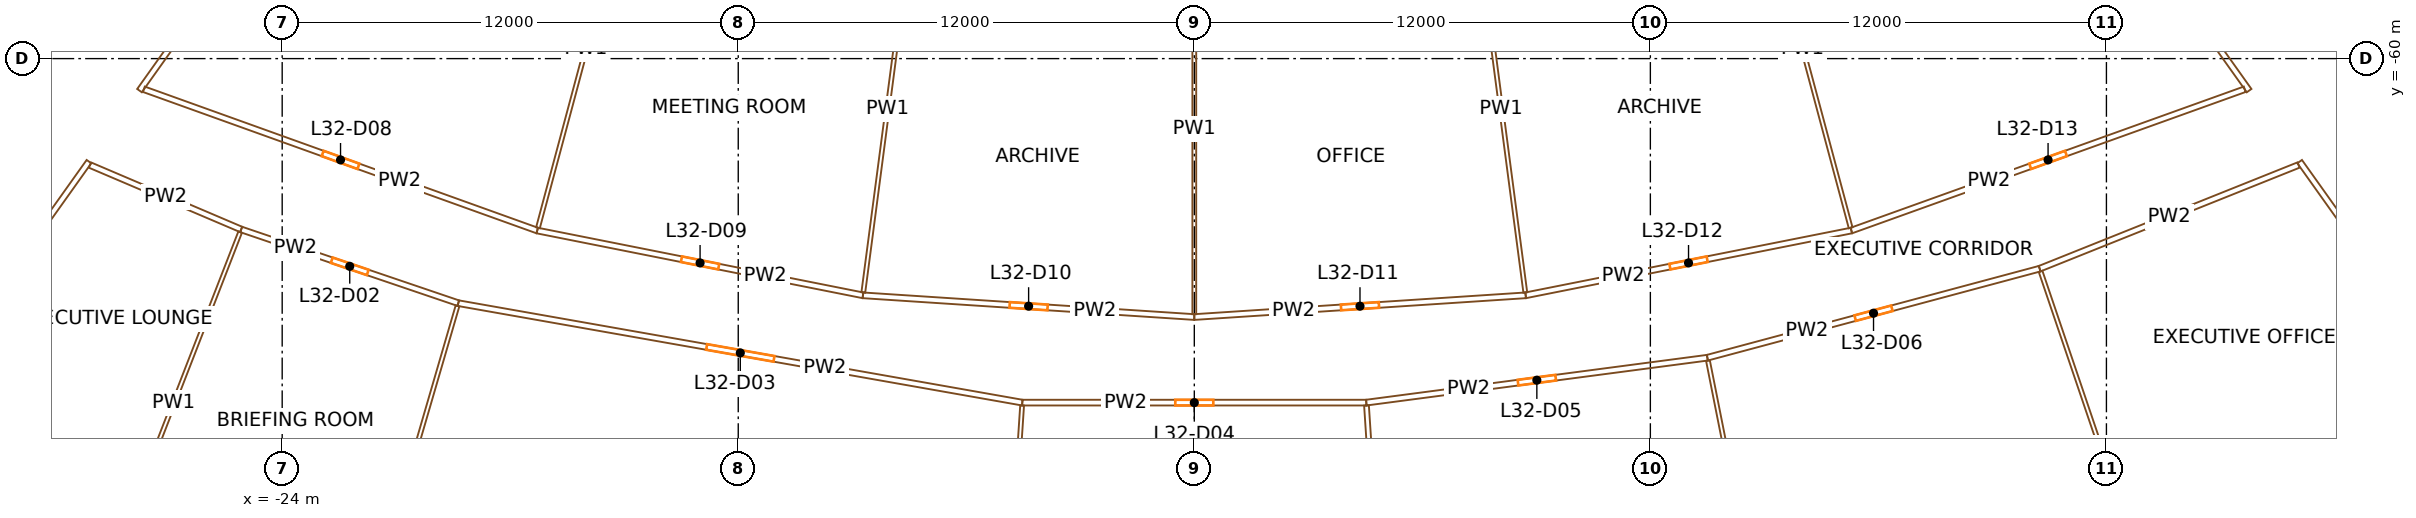
"""IFC4 building model, lengths in metres.
Left out: names, types, materials, properties, quantities, classifications, styles, units other than length and angle.
Written with IfcOpenShell. Run it as: python <this file> out.ifc"""

import sys

from ifc_helpers import new_model, si_unit, direction, frame, frame_2d, origin, place, context, subcontext, project, spatial, rectangle, extrude, element, fill, save


model = new_model("IFC4")
c1 = context("Model", 3, precision=1e-05, world=origin(), true_north=direction((0.0, 1.0)))
c2 = subcontext(c1, "Body", "Model", "MODEL_VIEW")
j1 = project(units=[si_unit("LENGTHUNIT", "METRE"), si_unit("PLANEANGLEUNIT", "RADIAN")], contexts=[c1])
p1 = place(None, origin())
s1 = spatial("IfcSite", under=j1, at=p1, CompositionType="ELEMENT")
p2 = place(p1, origin())
s2 = spatial("IfcBuilding", under=s1, at=p2, CompositionType="ELEMENT")
p3 = place(p2, frame((0.0, 0.0, 140.5)))
s3 = spatial("IfcBuildingStorey", under=s2, at=p3, CompositionType="ELEMENT", Elevation=140.5)
p4 = place(p3, frame((-36.717, -66.337, 0.0), z_axis=(0.0, 0.0, 1.0), x_axis=(0.573577477574, 0.819151315216, 0.0)))
e1 = element("IfcWall", 1, at=p4, inside=s3, PredefinedType="SHEAR", context=c2, shape_type="SweptSolid", body=[
    extrude(rectangle(XDim=14.8, YDim=0.9, at=frame_2d((7.4, 0.0))), origin(), (0.0, 0.0, 1.0), 3.4),
])
p5 = place(p4, frame((6.2, 0.0, 0.0)))
e2 = element("IfcOpeningElement", 2, at=p5, cuts=e1, PredefinedType="OPENING", context=c2, shape_type="SweptSolid", body=[
    extrude(rectangle(XDim=2.4, YDim=2.1, at=frame_2d((1.2, 1.05))), frame((0.0, 0.46, 0.0), z_axis=(0.0, -1.0, 0.0), x_axis=(1.0, 0.0, 0.0)), (0.0, 0.0, 1.0), 0.92),
])
p6 = place(p3, frame((36.717, -66.337, 0.0), z_axis=(0.0, 0.0, 1.0), x_axis=(-0.573577477574, 0.819151315216, 0.0)))
e3 = element("IfcWall", 3, at=p6, inside=s3, PredefinedType="SHEAR", context=c2, shape_type="SweptSolid", body=[
    extrude(rectangle(XDim=14.8, YDim=0.9, at=frame_2d((7.4, 0.0))), origin(), (0.0, 0.0, 1.0), 3.4),
])
p7 = place(p6, frame((6.2, 0.0, 0.0)))
e4 = element("IfcOpeningElement", 4, at=p7, cuts=e3, PredefinedType="OPENING", context=c2, shape_type="SweptSolid", body=[
    extrude(rectangle(XDim=2.4, YDim=2.1, at=frame_2d((1.2, 1.05))), frame((0.0, 0.46, 0.0), z_axis=(0.0, -1.0, 0.0), x_axis=(1.0, 0.0, 0.0)), (0.0, 0.0, 1.0), 0.92),
])
p8 = place(p3, frame((-29.084, -62.71, 0.0), z_axis=(0.0, 0.0, 1.0), x_axis=(-0.580031092611, -0.814594335608, 0.0)))
e5 = element("IfcWall", 5, at=p8, inside=s3, PredefinedType="PARTITIONING", context=c2, shape_type="SweptSolid", body=[
    extrude(rectangle(XDim=10.126, YDim=0.15, at=frame_2d((5.063, 0.0))), origin(), (0.0, 0.0, 1.0), 2.4),
])
p9 = place(p8, frame((4.563, 0.0, 0.0)))
e6 = element("IfcOpeningElement", 6, at=p9, cuts=e5, PredefinedType="OPENING", context=c2, shape_type="SweptSolid", body=[
    extrude(rectangle(XDim=1.0, YDim=2.1, at=frame_2d((0.5, 1.05))), frame((0.0, 0.085, 0.0), z_axis=(0.0, -1.0, 0.0), x_axis=(1.0, 0.0, 0.0)), (0.0, 0.0, 1.0), 0.17),
])
p10 = place(p3, frame((-29.059, -62.801, 0.0), z_axis=(0.0, 0.0, 1.0), x_axis=(0.9200243558, -0.391861180438, 0.0)))
e7 = element("IfcWall", 7, at=p10, inside=s3, PredefinedType="PARTITIONING", context=c2, shape_type="SweptSolid", body=[
    extrude(rectangle(XDim=4.326, YDim=0.15, at=frame_2d((2.163, 0.0))), origin(), (0.0, 0.0, 1.0), 2.4),
])
p11 = place(p3, frame((-28.612, -73.582, 0.0), z_axis=(0.0, 0.0, 1.0), x_axis=(0.362392675792, 0.93202550852, 0.0)))
e8 = element("IfcWall", 8, at=p11, inside=s3, PredefinedType="PARTITIONING", context=c2, shape_type="SweptSolid", body=[
    extrude(rectangle(XDim=9.674, YDim=0.1, at=frame_2d((4.837, 0.0))), origin(), (0.0, 0.0, 1.0), 2.4),
])
p12 = place(p3, frame((-27.64, -60.807, 0.0), z_axis=(0.0, 0.0, 1.0), x_axis=(0.941150861554, -0.337986768669, 0.0)))
e9 = element("IfcWall", 9, at=p12, inside=s3, PredefinedType="PARTITIONING", context=c2, shape_type="SweptSolid", body=[
    extrude(rectangle(XDim=10.998, YDim=0.15, at=frame_2d((5.499, 0.0))), origin(), (0.0, 0.0, 1.0), 2.4),
])
p13 = place(p12, frame((4.999, 0.0, 0.0)))
e10 = element("IfcOpeningElement", 10, at=p13, cuts=e9, PredefinedType="OPENING", context=c2, shape_type="SweptSolid", body=[
    extrude(rectangle(XDim=1.0, YDim=2.1, at=frame_2d((0.5, 1.05))), frame((0.0, 0.085, 0.0), z_axis=(0.0, -1.0, 0.0), x_axis=(1.0, 0.0, 0.0)), (0.0, 0.0, 1.0), 0.17),
])
p14 = place(p3, frame((-19.366, -66.435, 0.0), z_axis=(0.0, 0.0, 1.0), x_axis=(-0.94693295825, 0.321431131939, 0.0)))
e11 = element("IfcWall", 11, at=p14, inside=s3, PredefinedType="PARTITIONING", context=c2, shape_type="SweptSolid", body=[
    extrude(rectangle(XDim=6.033, YDim=0.15, at=frame_2d((3.017, 0.0))), origin(), (0.0, 0.0, 1.0), 2.4),
])
p15 = place(p14, frame((2.517, 0.0, 0.0)))
e12 = element("IfcOpeningElement", 12, at=p15, cuts=e11, PredefinedType="OPENING", context=c2, shape_type="SweptSolid", body=[
    extrude(rectangle(XDim=1.0, YDim=2.1, at=frame_2d((0.5, 1.05))), frame((0.0, 0.085, 0.0), z_axis=(0.0, -1.0, 0.0), x_axis=(1.0, 0.0, 0.0)), (0.0, 0.0, 1.0), 0.17),
])
p16 = place(p3, frame((-22.094, -75.794, 0.0), z_axis=(0.0, 0.0, 1.0), x_axis=(0.279846881911, 0.960044646194, 0.0)))
e13 = element("IfcWall", 13, at=p16, inside=s3, PredefinedType="PARTITIONING", context=c2, shape_type="SweptSolid", body=[
    extrude(rectangle(XDim=9.674, YDim=0.1, at=frame_2d((4.837, 0.0))), origin(), (0.0, 0.0, 1.0), 2.4),
])
p17 = place(p3, frame((-21.884, -52.598, 0.0), z_axis=(0.0, 0.0, 1.0), x_axis=(-0.580016763963, -0.814604538118, 0.0)))
e14 = element("IfcWall", 14, at=p17, inside=s3, PredefinedType="PARTITIONING", context=c2, shape_type="SweptSolid", body=[
    extrude(rectangle(XDim=10.121, YDim=0.15, at=frame_2d((5.061, 0.0))), origin(), (0.0, 0.0, 1.0), 2.4),
])
p18 = place(p3, frame((-4.526, -69.052, 0.0), z_axis=(0.0, 0.0, 1.0), x_axis=(-0.984805080703, 0.173663332402, 0.0)))
e15 = element("IfcWall", 15, at=p18, inside=s3, PredefinedType="PARTITIONING", context=c2, shape_type="SweptSolid", body=[
    extrude(rectangle(XDim=15.069, YDim=0.15, at=frame_2d((7.535, 0.0))), origin(), (0.0, 0.0, 1.0), 2.4),
])
p19 = place(p18, frame((6.635, 0.0, 0.0)))
e16 = element("IfcOpeningElement", 16, at=p19, cuts=e15, PredefinedType="OPENING", context=c2, shape_type="SweptSolid", body=[
    extrude(rectangle(XDim=1.8, YDim=2.1, at=frame_2d((0.9, 1.05))), frame((0.0, 0.085, 0.0), z_axis=(0.0, -1.0, 0.0), x_axis=(1.0, 0.0, 0.0)), (0.0, 0.0, 1.0), 0.17),
])
p20 = place(p3, frame((-17.289, -64.524, 0.0), z_axis=(0.0, 0.0, 1.0), x_axis=(0.980786466832, -0.195084357342, 0.0)))
e17 = element("IfcWall", 17, at=p20, inside=s3, PredefinedType="PARTITIONING", context=c2, shape_type="SweptSolid", body=[
    extrude(rectangle(XDim=8.738, YDim=0.15, at=frame_2d((4.369, 0.0))), origin(), (0.0, 0.0, 1.0), 2.4),
])
p21 = place(p20, frame((3.869, 0.0, 0.0)))
e18 = element("IfcOpeningElement", 18, at=p21, cuts=e17, PredefinedType="OPENING", context=c2, shape_type="SweptSolid", body=[
    extrude(rectangle(XDim=1.0, YDim=2.1, at=frame_2d((0.5, 1.05))), frame((0.0, 0.085, 0.0), z_axis=(0.0, -1.0, 0.0), x_axis=(1.0, 0.0, 0.0)), (0.0, 0.0, 1.0), 0.17),
])
p22 = place(p3, frame((-14.747, -55.037, 0.0), z_axis=(0.0, 0.0, 1.0), x_axis=(-0.258833329344, -0.965921998725, 0.0)))
e19 = element("IfcWall", 19, at=p22, inside=s3, PredefinedType="PARTITIONING", context=c2, shape_type="SweptSolid", body=[
    extrude(rectangle(XDim=9.746, YDim=0.1, at=frame_2d((4.873, 0.0))), origin(), (0.0, 0.0, 1.0), 2.4),
])
p23 = place(p3, frame((-8.719, -66.229, 0.0), z_axis=(0.0, 0.0, 1.0), x_axis=(0.997858593599, -0.065408158359, 0.0)))
e20 = element("IfcWall", 20, at=p23, inside=s3, PredefinedType="PARTITIONING", context=c2, shape_type="SweptSolid", body=[
    extrude(rectangle(XDim=8.738, YDim=0.15, at=frame_2d((4.369, 0.0))), origin(), (0.0, 0.0, 1.0), 2.4),
])
p24 = place(p23, frame((3.869, 0.0, 0.0)))
e21 = element("IfcOpeningElement", 21, at=p24, cuts=e20, PredefinedType="OPENING", context=c2, shape_type="SweptSolid", body=[
    extrude(rectangle(XDim=1.0, YDim=2.1, at=frame_2d((0.5, 1.05))), frame((0.0, 0.085, 0.0), z_axis=(0.0, -1.0, 0.0), x_axis=(1.0, 0.0, 0.0)), (0.0, 0.0, 1.0), 0.17),
])
p25 = place(p3, frame((-7.437, -56.491, 0.0), z_axis=(0.0, 0.0, 1.0), x_axis=(-0.13053421433, -0.99144380521, 0.0)))
e22 = element("IfcWall", 22, at=p25, inside=s3, PredefinedType="PARTITIONING", context=c2, shape_type="SweptSolid", body=[
    extrude(rectangle(XDim=9.746, YDim=0.1, at=frame_2d((4.873, 0.0))), origin(), (0.0, 0.0, 1.0), 2.4),
])
p26 = place(p3, frame((-5.173, -78.931, 0.0), z_axis=(0.0, 0.0, 1.0), x_axis=(0.065402415744, 0.997858970003, 0.0)))
e23 = element("IfcWall", 23, at=p26, inside=s3, PredefinedType="PARTITIONING", context=c2, shape_type="SweptSolid", body=[
    extrude(rectangle(XDim=9.825, YDim=0.1, at=frame_2d((4.913, 0.0))), origin(), (0.0, 0.0, 1.0), 2.4),
])
p27 = place(p3, frame((4.526, -69.052, 0.0), z_axis=(0.0, 0.0, 1.0), x_axis=(-1.0, 0.0, 0.0)))
e24 = element("IfcWall", 24, at=p27, inside=s3, PredefinedType="PARTITIONING", context=c2, shape_type="SweptSolid", body=[
    extrude(rectangle(XDim=9.052, YDim=0.15, at=frame_2d((4.526, 0.0))), origin(), (0.0, 0.0, 1.0), 2.4),
])
p28 = place(p27, frame((4.026, 0.0, 0.0)))
e25 = element("IfcOpeningElement", 25, at=p28, cuts=e24, PredefinedType="OPENING", context=c2, shape_type="SweptSolid", body=[
    extrude(rectangle(XDim=1.0, YDim=2.1, at=frame_2d((0.5, 1.05))), frame((0.0, 0.085, 0.0), z_axis=(0.0, -1.0, 0.0), x_axis=(1.0, 0.0, 0.0)), (0.0, 0.0, 1.0), 0.17),
])
p29 = place(p3, frame((0.0, -66.8, 0.0), z_axis=(0.0, 0.0, 1.0), x_axis=(0.997858593599, 0.065408158359, 0.0)))
e26 = element("IfcWall", 26, at=p29, inside=s3, PredefinedType="PARTITIONING", context=c2, shape_type="SweptSolid", body=[
    extrude(rectangle(XDim=8.738, YDim=0.15, at=frame_2d((4.369, 0.0))), origin(), (0.0, 0.0, 1.0), 2.4),
])
p30 = place(p29, frame((3.869, 0.0, 0.0)))
e27 = element("IfcOpeningElement", 27, at=p30, cuts=e26, PredefinedType="OPENING", context=c2, shape_type="SweptSolid", body=[
    extrude(rectangle(XDim=1.0, YDim=2.1, at=frame_2d((0.5, 1.05))), frame((0.0, 0.085, 0.0), z_axis=(0.0, -1.0, 0.0), x_axis=(1.0, 0.0, 0.0)), (0.0, 0.0, 1.0), 0.17),
])
p31 = place(p3, frame((0.0, -56.979, 0.0), z_axis=(0.0, 0.0, 1.0), x_axis=(0.0, -1.0, 0.0)))
e28 = element("IfcWall", 28, at=p31, inside=s3, PredefinedType="PARTITIONING", context=c2, shape_type="SweptSolid", body=[
    extrude(rectangle(XDim=9.747, YDim=0.1, at=frame_2d((4.873, 0.0))), origin(), (0.0, 0.0, 1.0), 2.4),
])
p32 = place(p3, frame((13.5, -67.87, 0.0), z_axis=(0.0, 0.0, 1.0), x_axis=(-0.991446306881, -0.13051521203, 0.0)))
e29 = element("IfcWall", 29, at=p32, inside=s3, PredefinedType="PARTITIONING", context=c2, shape_type="SweptSolid", body=[
    extrude(rectangle(XDim=9.052, YDim=0.15, at=frame_2d((4.526, 0.0))), origin(), (0.0, 0.0, 1.0), 2.4),
])
p33 = place(p32, frame((4.026, 0.0, 0.0)))
e30 = element("IfcOpeningElement", 30, at=p33, cuts=e29, PredefinedType="OPENING", context=c2, shape_type="SweptSolid", body=[
    extrude(rectangle(XDim=1.0, YDim=2.1, at=frame_2d((0.5, 1.05))), frame((0.0, 0.085, 0.0), z_axis=(0.0, -1.0, 0.0), x_axis=(1.0, 0.0, 0.0)), (0.0, 0.0, 1.0), 0.17),
])
p34 = place(p3, frame((5.173, -78.931, 0.0), z_axis=(0.0, 0.0, 1.0), x_axis=(-0.065402415744, 0.997858970003, 0.0)))
e31 = element("IfcWall", 31, at=p34, inside=s3, PredefinedType="MOVABLE", context=c2, shape_type="SweptSolid", body=[
    extrude(rectangle(XDim=9.825, YDim=0.125, at=frame_2d((4.913, 0.0))), origin(), (0.0, 0.0, 1.0), 2.4),
])
p35 = place(p3, frame((7.437, -56.491, 0.0), z_axis=(0.0, 0.0, 1.0), x_axis=(0.13053421433, -0.99144380521, 0.0)))
e32 = element("IfcWall", 32, at=p35, inside=s3, PredefinedType="PARTITIONING", context=c2, shape_type="SweptSolid", body=[
    extrude(rectangle(XDim=9.746, YDim=0.1, at=frame_2d((4.873, 0.0))), origin(), (0.0, 0.0, 1.0), 2.4),
])
p36 = place(p3, frame((8.719, -66.229, 0.0), z_axis=(0.0, 0.0, 1.0), x_axis=(0.980786466832, 0.195084357342, 0.0)))
e33 = element("IfcWall", 33, at=p36, inside=s3, PredefinedType="PARTITIONING", context=c2, shape_type="SweptSolid", body=[
    extrude(rectangle(XDim=8.738, YDim=0.15, at=frame_2d((4.369, 0.0))), origin(), (0.0, 0.0, 1.0), 2.4),
])
p37 = place(p36, frame((3.869, 0.0, 0.0)))
e34 = element("IfcOpeningElement", 34, at=p37, cuts=e33, PredefinedType="OPENING", context=c2, shape_type="SweptSolid", body=[
    extrude(rectangle(XDim=1.0, YDim=2.1, at=frame_2d((0.5, 1.05))), frame((0.0, 0.085, 0.0), z_axis=(0.0, -1.0, 0.0), x_axis=(1.0, 0.0, 0.0)), (0.0, 0.0, 1.0), 0.17),
])
p38 = place(p3, frame((22.244, -65.528, 0.0), z_axis=(0.0, 0.0, 1.0), x_axis=(-0.965926260719, -0.258817423781, 0.0)))
e35 = element("IfcWall", 35, at=p38, inside=s3, PredefinedType="PARTITIONING", context=c2, shape_type="SweptSolid", body=[
    extrude(rectangle(XDim=9.052, YDim=0.15, at=frame_2d((4.526, 0.0))), origin(), (0.0, 0.0, 1.0), 2.4),
])
p39 = place(p38, frame((4.026, 0.0, 0.0)))
e36 = element("IfcOpeningElement", 36, at=p39, cuts=e35, PredefinedType="OPENING", context=c2, shape_type="SweptSolid", body=[
    extrude(rectangle(XDim=1.0, YDim=2.1, at=frame_2d((0.5, 1.05))), frame((0.0, 0.085, 0.0), z_axis=(0.0, -1.0, 0.0), x_axis=(1.0, 0.0, 0.0)), (0.0, 0.0, 1.0), 0.17),
])
p40 = place(p3, frame((14.747, -55.037, 0.0), z_axis=(0.0, 0.0, 1.0), x_axis=(0.258833329344, -0.965921998725, 0.0)))
e37 = element("IfcWall", 37, at=p40, inside=s3, PredefinedType="PARTITIONING", context=c2, shape_type="SweptSolid", body=[
    extrude(rectangle(XDim=9.746, YDim=0.1, at=frame_2d((4.873, 0.0))), origin(), (0.0, 0.0, 1.0), 2.4),
])
p41 = place(p3, frame((15.432, -77.58, 0.0), z_axis=(0.0, 0.0, 1.0), x_axis=(-0.195088621536, 0.980785618648, 0.0)))
e38 = element("IfcWall", 38, at=p41, inside=s3, PredefinedType="PARTITIONING", context=c2, shape_type="SweptSolid", body=[
    extrude(rectangle(XDim=9.825, YDim=0.1, at=frame_2d((4.913, 0.0))), origin(), (0.0, 0.0, 1.0), 2.4),
])
p42 = place(p3, frame((17.289, -64.524, 0.0), z_axis=(0.0, 0.0, 1.0), x_axis=(0.941150861554, 0.337986768669, 0.0)))
e39 = element("IfcWall", 39, at=p42, inside=s3, PredefinedType="PARTITIONING", context=c2, shape_type="SweptSolid", body=[
    extrude(rectangle(XDim=10.998, YDim=0.15, at=frame_2d((5.499, 0.0))), origin(), (0.0, 0.0, 1.0), 2.4),
])
p43 = place(p42, frame((4.999, 0.0, 0.0)))
e40 = element("IfcOpeningElement", 40, at=p43, cuts=e39, PredefinedType="OPENING", context=c2, shape_type="SweptSolid", body=[
    extrude(rectangle(XDim=1.0, YDim=2.1, at=frame_2d((0.5, 1.05))), frame((0.0, 0.085, 0.0), z_axis=(0.0, -1.0, 0.0), x_axis=(1.0, 0.0, 0.0)), (0.0, 0.0, 1.0), 0.17),
])
p44 = place(p3, frame((21.884, -52.598, 0.0), z_axis=(0.0, 0.0, 1.0), x_axis=(0.580016763963, -0.814604538118, 0.0)))
e41 = element("IfcWall", 41, at=p44, inside=s3, PredefinedType="PARTITIONING", context=c2, shape_type="SweptSolid", body=[
    extrude(rectangle(XDim=10.121, YDim=0.15, at=frame_2d((5.061, 0.0))), origin(), (0.0, 0.0, 1.0), 2.4),
])
p45 = place(p3, frame((22.244, -65.528, 0.0), z_axis=(0.0, 0.0, 1.0), x_axis=(0.92834358791, 0.371723261025, 0.0)))
e42 = element("IfcWall", 42, at=p45, inside=s3, PredefinedType="PARTITIONING", context=c2, shape_type="SweptSolid", body=[
    extrude(rectangle(XDim=7.34, YDim=0.15, at=frame_2d((3.67, 0.0))), origin(), (0.0, 0.0, 1.0), 2.4),
])
p46 = place(p3, frame((25.426, -74.902, 0.0), z_axis=(0.0, 0.0, 1.0), x_axis=(-0.3214264651, 0.94693454237, 0.0)))
e43 = element("IfcWall", 43, at=p46, inside=s3, PredefinedType="PARTITIONING", context=c2, shape_type="SweptSolid", body=[
    extrude(rectangle(XDim=9.825, YDim=0.1, at=frame_2d((4.912, 0.0))), origin(), (0.0, 0.0, 1.0), 2.4),
])
p47 = place(p3, frame((34.958, -70.959, 0.0), z_axis=(0.0, 0.0, 1.0), x_axis=(-0.580031092611, 0.814594335608, 0.0)))
e44 = element("IfcWall", 44, at=p47, inside=s3, PredefinedType="PARTITIONING", context=c2, shape_type="SweptSolid", body=[
    extrude(rectangle(XDim=10.126, YDim=0.15, at=frame_2d((5.063, 0.0))), origin(), (0.0, 0.0, 1.0), 2.4),
])
p48 = place(p47, frame((4.563, 0.0, 0.0)))
e45 = element("IfcOpeningElement", 45, at=p48, cuts=e44, PredefinedType="OPENING", context=c2, shape_type="SweptSolid", body=[
    extrude(rectangle(XDim=1.0, YDim=2.1, at=frame_2d((0.5, 1.05))), frame((0.0, 0.085, 0.0), z_axis=(0.0, -1.0, 0.0), x_axis=(1.0, 0.0, 0.0)), (0.0, 0.0, 1.0), 0.17),
])
p49 = place(p15, origin())
e46 = element("IfcDoor", 46, at=p49, inside=s3, OperationType="SINGLE_SWING_RIGHT", PredefinedType="DOOR", context=c2, shape_type="SweptSolid", body=[
    extrude(rectangle(XDim=1.0, YDim=2.1, at=frame_2d((0.5, 1.05))), frame((0.0, 0.025, 0.0), z_axis=(0.0, -1.0, 0.0), x_axis=(1.0, 0.0, 0.0)), (0.0, 0.0, 1.0), 0.05),
])
fill(e12, e46)
p50 = place(p19, origin())
e47 = element("IfcDoor", 47, at=p50, inside=s3, OperationType="DOUBLE_DOOR_SINGLE_SWING", PredefinedType="DOOR", context=c2, shape_type="SweptSolid", body=[
    extrude(rectangle(XDim=1.8, YDim=2.1, at=frame_2d((0.9, 1.05))), frame((0.0, 0.025, 0.0), z_axis=(0.0, -1.0, 0.0), x_axis=(1.0, 0.0, 0.0)), (0.0, 0.0, 1.0), 0.05),
])
fill(e16, e47)
p51 = place(p28, origin())
e48 = element("IfcDoor", 48, at=p51, inside=s3, OperationType="SINGLE_SWING_RIGHT", PredefinedType="DOOR", context=c2, shape_type="SweptSolid", body=[
    extrude(rectangle(XDim=1.0, YDim=2.1, at=frame_2d((0.5, 1.05))), frame((0.0, 0.025, 0.0), z_axis=(0.0, -1.0, 0.0), x_axis=(1.0, 0.0, 0.0)), (0.0, 0.0, 1.0), 0.05),
])
fill(e25, e48)
p52 = place(p33, origin())
e49 = element("IfcDoor", 49, at=p52, inside=s3, OperationType="SINGLE_SWING_RIGHT", PredefinedType="DOOR", context=c2, shape_type="SweptSolid", body=[
    extrude(rectangle(XDim=1.0, YDim=2.1, at=frame_2d((0.5, 1.05))), frame((0.0, 0.025, 0.0), z_axis=(0.0, -1.0, 0.0), x_axis=(1.0, 0.0, 0.0)), (0.0, 0.0, 1.0), 0.05),
])
fill(e30, e49)
p53 = place(p39, origin())
e50 = element("IfcDoor", 50, at=p53, inside=s3, OperationType="SINGLE_SWING_RIGHT", PredefinedType="DOOR", context=c2, shape_type="SweptSolid", body=[
    extrude(rectangle(XDim=1.0, YDim=2.1, at=frame_2d((0.5, 1.05))), frame((0.0, 0.025, 0.0), z_axis=(0.0, -1.0, 0.0), x_axis=(1.0, 0.0, 0.0)), (0.0, 0.0, 1.0), 0.05),
])
fill(e36, e50)
p54 = place(p13, origin())
e51 = element("IfcDoor", 51, at=p54, inside=s3, OperationType="SINGLE_SWING_RIGHT", PredefinedType="DOOR", context=c2, shape_type="SweptSolid", body=[
    extrude(rectangle(XDim=1.0, YDim=2.1, at=frame_2d((0.5, 1.05))), frame((0.0, 0.025, 0.0), z_axis=(0.0, -1.0, 0.0), x_axis=(1.0, 0.0, 0.0)), (0.0, 0.0, 1.0), 0.05),
])
fill(e10, e51)
p55 = place(p21, origin())
e52 = element("IfcDoor", 52, at=p55, inside=s3, OperationType="SINGLE_SWING_RIGHT", PredefinedType="DOOR", context=c2, shape_type="SweptSolid", body=[
    extrude(rectangle(XDim=1.0, YDim=2.1, at=frame_2d((0.5, 1.05))), frame((0.0, 0.025, 0.0), z_axis=(0.0, -1.0, 0.0), x_axis=(1.0, 0.0, 0.0)), (0.0, 0.0, 1.0), 0.05),
])
fill(e18, e52)
p56 = place(p24, origin())
e53 = element("IfcDoor", 53, at=p56, inside=s3, OperationType="SINGLE_SWING_RIGHT", PredefinedType="DOOR", context=c2, shape_type="SweptSolid", body=[
    extrude(rectangle(XDim=1.0, YDim=2.1, at=frame_2d((0.5, 1.05))), frame((0.0, 0.025, 0.0), z_axis=(0.0, -1.0, 0.0), x_axis=(1.0, 0.0, 0.0)), (0.0, 0.0, 1.0), 0.05),
])
fill(e21, e53)
p57 = place(p30, origin())
e54 = element("IfcDoor", 54, at=p57, inside=s3, OperationType="SINGLE_SWING_RIGHT", PredefinedType="DOOR", context=c2, shape_type="SweptSolid", body=[
    extrude(rectangle(XDim=1.0, YDim=2.1, at=frame_2d((0.5, 1.05))), frame((0.0, 0.025, 0.0), z_axis=(0.0, -1.0, 0.0), x_axis=(1.0, 0.0, 0.0)), (0.0, 0.0, 1.0), 0.05),
])
fill(e27, e54)
p58 = place(p37, origin())
e55 = element("IfcDoor", 55, at=p58, inside=s3, OperationType="SINGLE_SWING_RIGHT", PredefinedType="DOOR", context=c2, shape_type="SweptSolid", body=[
    extrude(rectangle(XDim=1.0, YDim=2.1, at=frame_2d((0.5, 1.05))), frame((0.0, 0.025, 0.0), z_axis=(0.0, -1.0, 0.0), x_axis=(1.0, 0.0, 0.0)), (0.0, 0.0, 1.0), 0.05),
])
fill(e34, e55)
p59 = place(p43, origin())
e56 = element("IfcDoor", 56, at=p59, inside=s3, OperationType="SINGLE_SWING_RIGHT", PredefinedType="DOOR", context=c2, shape_type="SweptSolid", body=[
    extrude(rectangle(XDim=1.0, YDim=2.1, at=frame_2d((0.5, 1.05))), frame((0.0, 0.025, 0.0), z_axis=(0.0, -1.0, 0.0), x_axis=(1.0, 0.0, 0.0)), (0.0, 0.0, 1.0), 0.05),
])
fill(e40, e56)
save(model, sys.argv[1])
